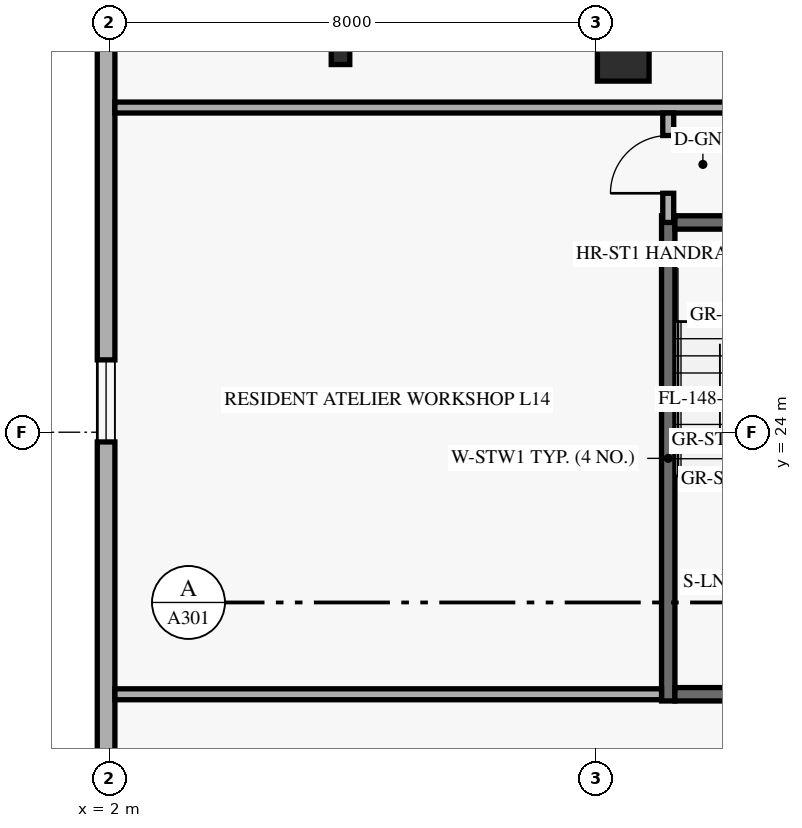
"""IFC4 building model, lengths in metres.
Left out: names, types, materials, properties, quantities, classifications, styles, units other than length and angle.
Written with IfcOpenShell. Run it as: python <this file> out.ifc"""

import sys

from ifc_helpers import new_model, si_unit, direction, frame, frame_2d, origin, origin_2d, place, context, subcontext, project, spatial, rectangle, hollow_rectangle, extrude, element, fill, save


model = new_model("IFC4")
c1 = context("Model", 3, precision=1e-05, world=origin(), true_north=direction((0.0, 1.0)))
c2 = subcontext(c1, "Body", "Model", "MODEL_VIEW")
j1 = project(units=[si_unit("LENGTHUNIT", "METRE"), si_unit("PLANEANGLEUNIT", "RADIAN")], contexts=[c1])
p1 = place(None, origin())
s1 = spatial("IfcSite", under=j1, at=p1, CompositionType="ELEMENT")
p2 = place(p1, origin())
s2 = spatial("IfcBuilding", under=s1, at=p2, CompositionType="ELEMENT")
p3 = place(p2, frame((0.0, 0.0, 56.4)))
s3 = spatial("IfcBuildingStorey", under=s2, at=p3, CompositionType="ELEMENT", Elevation=56.4)
p4 = place(p3, frame((11.19, 19.58, 0.0), z_axis=(0.0, 0.0, 1.0), x_axis=(0.0, 1.0, 0.0)))
e1 = element("IfcWall", 1, at=p4, inside=s3, PredefinedType="SHEAR", context=c2, shape_type="SweptSolid", body=[
    extrude(rectangle(XDim=7.98, YDim=0.22, at=frame_2d((3.99, 0.0))), origin(), (0.0, 0.0, 1.0), 2.657),
])
p5 = place(p3, frame((11.3, 19.69, 0.0), z_axis=(0.0, 0.0, 1.0), x_axis=(1.0, 0.0, 0.0)))
e2 = element("IfcWall", 2, at=p5, inside=s3, PredefinedType="SHEAR", context=c2, shape_type="SweptSolid", body=[
    extrude(rectangle(XDim=3.16, YDim=0.22, at=frame_2d((1.58, 0.0))), origin(), (0.0, 0.0, 1.0), 2.657),
])
p6 = place(p3, frame((11.3, 27.45, 0.0), z_axis=(0.0, 0.0, 1.0), x_axis=(1.0, 0.0, 0.0)))
e3 = element("IfcWall", 3, at=p6, inside=s3, PredefinedType="SHEAR", context=c2, shape_type="SweptSolid", body=[
    extrude(rectangle(XDim=3.16, YDim=0.22, at=frame_2d((1.58, 0.0))), origin(), (0.0, 0.0, 1.0), 2.657),
])
p7 = place(p6, frame((0.85, 0.0, 0.0)))
e4 = element("IfcOpeningElement", 4, at=p7, cuts=e3, PredefinedType="OPENING", context=c2, shape_type="SweptSolid", body=[
    extrude(rectangle(XDim=1.05, YDim=2.15, at=frame_2d((0.525, 1.075))), frame((0.0, 0.12, 0.0), z_axis=(0.0, -1.0, 0.0), x_axis=(1.0, 0.0, 0.0)), (0.0, 0.0, 1.0), 0.24),
])
p8 = place(p3, frame((5.8, 30.2, 0.0), z_axis=(0.0, 0.0, 1.0), x_axis=(1.0, 0.0, 0.0)))
e5 = element("IfcColumn", 5, at=p8, inside=s3, PredefinedType="COLUMN", context=c2, shape_type="SweptSolid", body=[
    extrude(hollow_rectangle(XDim=0.305, YDim=0.305, WallThickness=0.013, at=origin_2d()), origin(), (0.0, 0.0, 1.0), 3.6),
])
p9 = place(p3, frame((10.45, 30.2, 0.0), z_axis=(0.0, 0.0, 1.0), x_axis=(1.0, 0.0, 0.0)))
e6 = element("IfcColumn", 6, at=p9, inside=s3, PredefinedType="COLUMN", context=c2, shape_type="SweptSolid", body=[
    extrude(rectangle(XDim=0.85, YDim=0.85, at=origin_2d()), origin(), (0.0, 0.0, 1.0), 3.6),
])
p10 = place(p3, frame((1.945, 43.38, 0.0), z_axis=(0.0, 0.0, 1.0), x_axis=(0.0, -1.0, 0.0)))
e7 = element("IfcWall", 7, at=p10, inside=s3, PredefinedType="SOLIDWALL", context=c2, shape_type="SweptSolid", body=[
    extrude(rectangle(XDim=38.76, YDim=0.29, at=frame_2d((19.38, 0.0))), origin(), (0.0, 0.0, 1.0), 3.35),
])
p11 = place(p10, frame((35.212, 0.0, 0.85)))
e8 = element("IfcOpeningElement", 8, at=p11, cuts=e7, PredefinedType="OPENING", context=c2, shape_type="SweptSolid", body=[
    extrude(rectangle(XDim=1.35, YDim=1.55, at=frame_2d((0.675, 0.775))), frame((0.0, 0.155, 0.0), z_axis=(0.0, -1.0, 0.0), x_axis=(1.0, 0.0, 0.0)), (0.0, 0.0, 1.0), 0.31),
])
p12 = place(p10, frame((27.677, 0.0, 0.85)))
e9 = element("IfcOpeningElement", 9, at=p12, cuts=e7, PredefinedType="OPENING", context=c2, shape_type="SweptSolid", body=[
    extrude(rectangle(XDim=1.35, YDim=1.55, at=frame_2d((0.675, 0.775))), frame((0.0, 0.155, 0.0), z_axis=(0.0, -1.0, 0.0), x_axis=(1.0, 0.0, 0.0)), (0.0, 0.0, 1.0), 0.31),
])
p13 = place(p10, frame((18.19, 0.0, 0.85)))
e10 = element("IfcOpeningElement", 10, at=p13, cuts=e7, PredefinedType="OPENING", context=c2, shape_type="SweptSolid", body=[
    extrude(rectangle(XDim=1.35, YDim=1.55, at=frame_2d((0.675, 0.775))), frame((0.0, 0.155, 0.0), z_axis=(0.0, -1.0, 0.0), x_axis=(1.0, 0.0, 0.0)), (0.0, 0.0, 1.0), 0.31),
])
p14 = place(p10, frame((8.965, 0.0, 0.85)))
e11 = element("IfcOpeningElement", 11, at=p14, cuts=e7, PredefinedType="OPENING", context=c2, shape_type="SweptSolid", body=[
    extrude(rectangle(XDim=1.35, YDim=1.55, at=frame_2d((0.675, 0.775))), frame((0.0, 0.155, 0.0), z_axis=(0.0, -1.0, 0.0), x_axis=(1.0, 0.0, 0.0)), (0.0, 0.0, 1.0), 0.31),
])
p15 = place(p10, frame((1.945, 0.0, 0.85)))
e12 = element("IfcOpeningElement", 12, at=p15, cuts=e7, PredefinedType="OPENING", context=c2, shape_type="SweptSolid", body=[
    extrude(rectangle(XDim=1.35, YDim=1.55, at=frame_2d((0.675, 0.775))), frame((0.0, 0.155, 0.0), z_axis=(0.0, -1.0, 0.0), x_axis=(1.0, 0.0, 0.0)), (0.0, 0.0, 1.0), 0.31),
])
p16 = place(p3, frame((2.09, 29.34, 0.0), z_axis=(0.0, 0.0, 1.0), x_axis=(1.0, 0.0, 0.0)))
e13 = element("IfcWall", 13, at=p16, inside=s3, PredefinedType="STANDARD", context=c2, shape_type="SweptSolid", body=[
    extrude(rectangle(XDim=19.47, YDim=0.18, at=frame_2d((9.735, 0.0))), origin(), (0.0, 0.0, 1.0), 2.639),
])
p17 = place(p3, frame((11.19, 27.45, 0.0), z_axis=(0.0, 0.0, 1.0), x_axis=(0.0, 1.0, 0.0)))
e14 = element("IfcWall", 14, at=p17, inside=s3, PredefinedType="STANDARD", context=c2, shape_type="SweptSolid", body=[
    extrude(rectangle(XDim=1.8, YDim=0.18, at=frame_2d((0.9, 0.0))), origin(), (0.0, 0.0, 1.0), 2.639),
])
p18 = place(p17, frame((0.48, 0.0, 0.0)))
e15 = element("IfcOpeningElement", 15, at=p18, cuts=e14, PredefinedType="OPENING", context=c2, shape_type="SweptSolid", body=[
    extrude(rectangle(XDim=0.95, YDim=2.15, at=frame_2d((0.475, 1.075))), frame((0.0, 0.1, 0.0), z_axis=(0.0, -1.0, 0.0), x_axis=(1.0, 0.0, 0.0)), (0.0, 0.0, 1.0), 0.2),
])
p19 = place(p3, frame((2.09, 19.69, 0.0), z_axis=(0.0, 0.0, 1.0), x_axis=(1.0, 0.0, 0.0)))
e16 = element("IfcWall", 16, at=p19, inside=s3, PredefinedType="PARTITIONING", context=c2, shape_type="SweptSolid", body=[
    extrude(rectangle(XDim=8.99, YDim=0.18, at=frame_2d((4.495, 0.0))), origin(), (0.0, 0.0, 1.0), 2.639),
])
p20 = place(p13, origin())
e17 = element("IfcWindow", 17, at=p20, inside=s3, PartitioningType="SINGLE_PANEL", PredefinedType="WINDOW", context=c2, shape_type="SweptSolid", body=[
    extrude(rectangle(XDim=1.35, YDim=1.55, at=frame_2d((0.675, 0.775))), frame((0.0, 0.03, 0.0), z_axis=(0.0, -1.0, 0.0), x_axis=(1.0, 0.0, 0.0)), (0.0, 0.0, 1.0), 0.06),
])
fill(e10, e17)
p21 = place(p18, origin())
e18 = element("IfcDoor", 18, at=p21, inside=s3, OperationType="SINGLE_SWING_LEFT", PredefinedType="DOOR", context=c2, shape_type="SweptSolid", body=[
    extrude(rectangle(XDim=0.95, YDim=2.15, at=frame_2d((0.475, 1.075))), frame((0.0, 0.025, 0.0), z_axis=(0.0, -1.0, 0.0), x_axis=(1.0, 0.0, 0.0)), (0.0, 0.0, 1.0), 0.05),
])
fill(e15, e18)
save(model, sys.argv[1])
